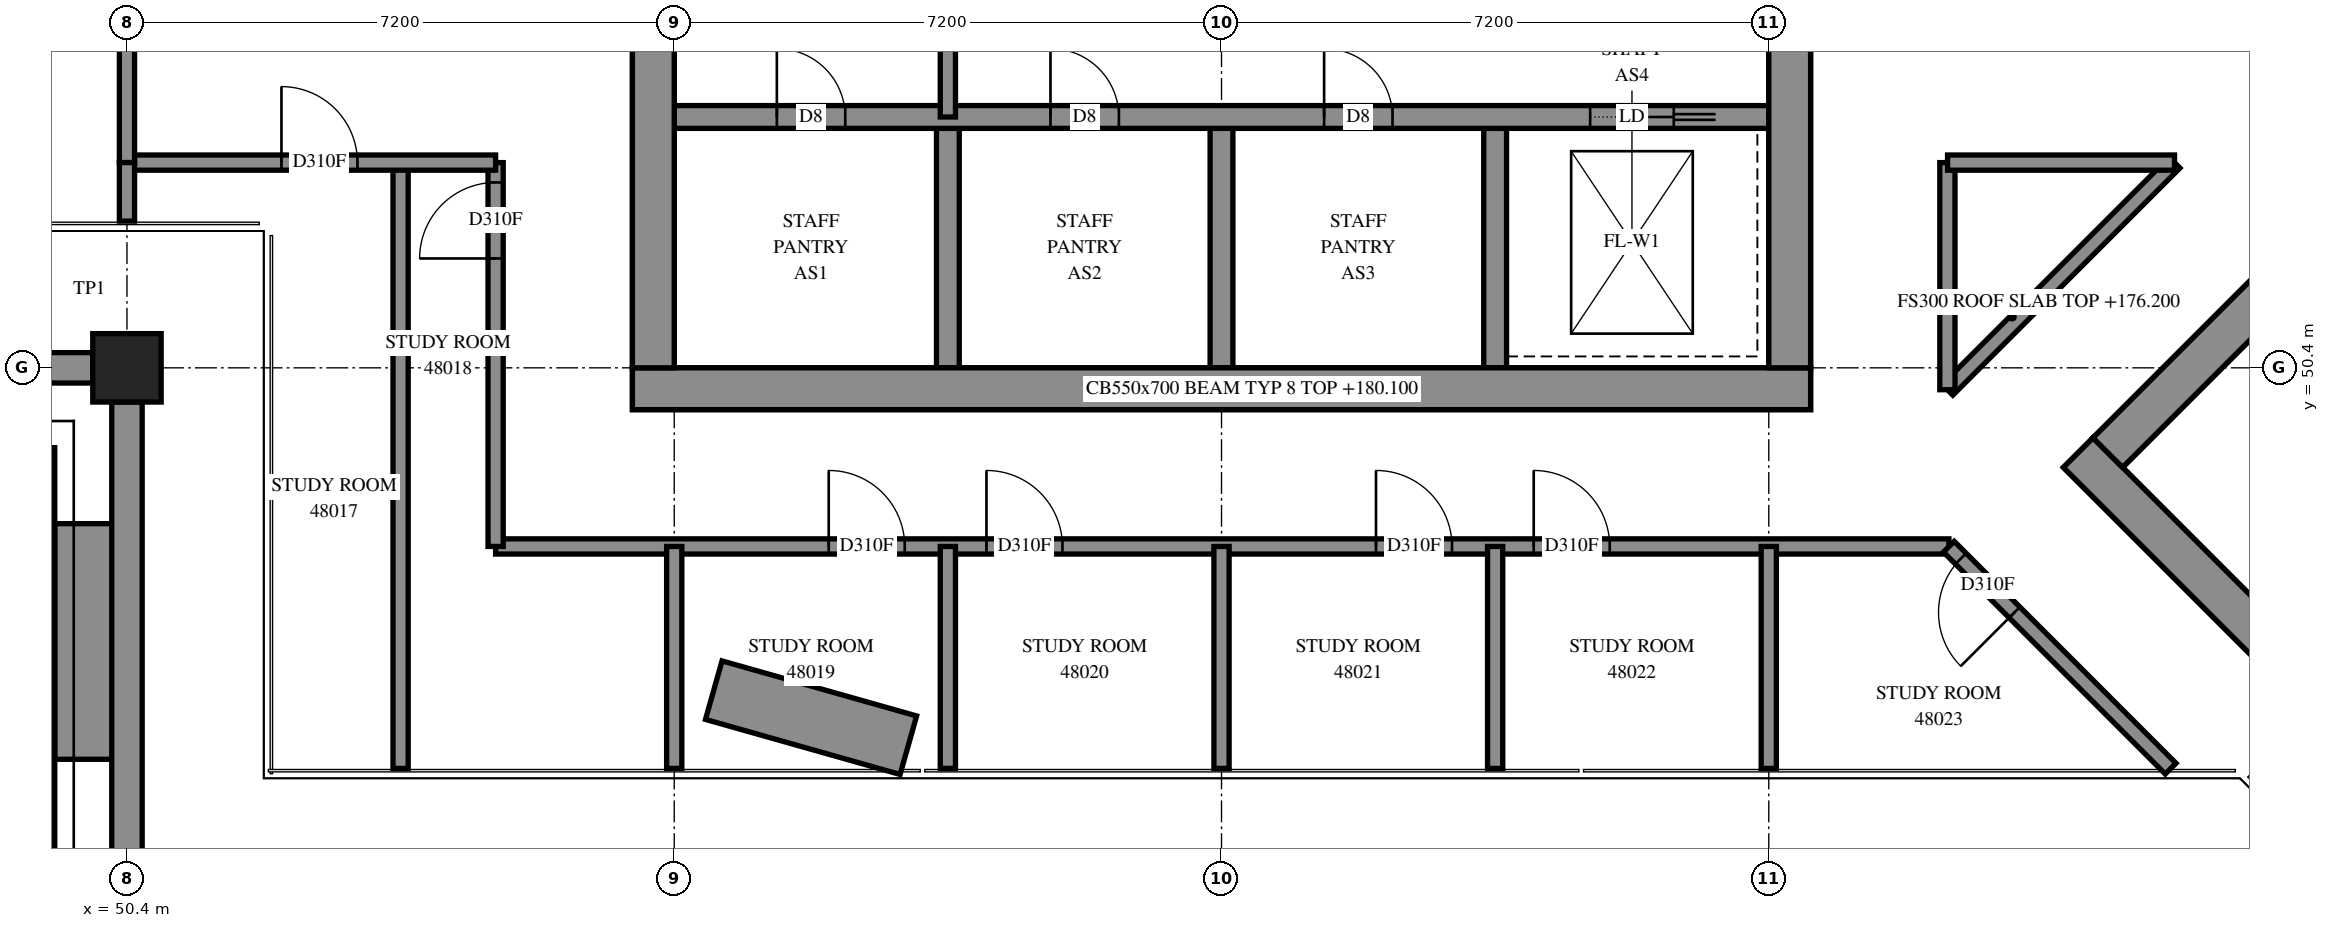
"""IFC4 building model, lengths in metres.
Left out: names, types, materials, properties, quantities, classifications, styles, units other than length and angle.
Written with IfcOpenShell. Run it as: python <this file> out.ifc"""

import sys

from ifc_helpers import new_model, si_unit, direction, frame, frame_2d, origin, origin_2d, place, context, subcontext, project, spatial, polyline, rectangle, outline, extrude, element, fill, save


model = new_model("IFC4")
c1 = context("Model", 3, precision=1e-05, world=origin(), true_north=direction((0.0, 1.0)))
c2 = subcontext(c1, "Body", "Model", "MODEL_VIEW")
j1 = project(units=[si_unit("LENGTHUNIT", "METRE"), si_unit("PLANEANGLEUNIT", "RADIAN")], contexts=[c1])
p1 = place(None, origin())
s1 = spatial("IfcSite", under=j1, at=p1, CompositionType="ELEMENT")
p2 = place(p1, origin())
s2 = spatial("IfcBuilding", under=s1, at=p2, CompositionType="ELEMENT")
p3 = place(p2, frame((0.0, 0.0, 176.2)))
s3 = spatial("IfcBuildingStorey", under=s2, at=p3, CompositionType="ELEMENT", Elevation=176.2)
p4 = place(p3, frame((50.4, 50.4, 0.0), z_axis=(0.0, 0.0, 1.0), x_axis=(1.0, 0.0, 0.0)))
e1 = element("IfcColumn", 1, at=p4, inside=s3, PredefinedType="COLUMN", context=c2, shape_type="SweptSolid", body=[
    extrude(rectangle(XDim=0.9, YDim=0.9, at=origin_2d()), origin(), (0.0, 0.0, 1.0), 3.9),
])
p5 = place(p3, frame((57.05, 50.125, -0.3), z_axis=(0.0, 0.0, 1.0), x_axis=(1.0, 0.0, 0.0)))
e2 = element("IfcWall", 2, at=p5, inside=s3, PredefinedType="SHEAR", context=c2, shape_type="SweptSolid", body=[
    extrude(rectangle(XDim=15.5, YDim=0.55, at=frame_2d((7.75, 0.0))), origin(), (0.0, 0.0, 1.0), 3.5),
])
p6 = place(p3, frame((57.325, 50.4, -0.3), z_axis=(0.0, 0.0, 1.0), x_axis=(0.0, 1.0, 0.0)))
e3 = element("IfcWall", 3, at=p6, inside=s3, PredefinedType="SHEAR", context=c2, shape_type="SweptSolid", body=[
    extrude(rectangle(XDim=14.4, YDim=0.55, at=frame_2d((7.2, 0.0))), origin(), (0.0, 0.0, 1.0), 3.5),
])
p7 = place(p6, frame((4.55, 0.0, 0.3)))
e4 = element("IfcOpeningElement", 4, at=p7, cuts=e3, PredefinedType="OPENING", context=c2, shape_type="SweptSolid", body=[
    extrude(rectangle(XDim=1.1, YDim=2.1, at=frame_2d((0.55, 1.05))), frame((0.0, 0.285, 0.0), z_axis=(0.0, -1.0, 0.0), x_axis=(1.0, 0.0, 0.0)), (0.0, 0.0, 1.0), 0.57),
])
p8 = place(p6, frame((11.35, 0.0, 0.3)))
e5 = element("IfcOpeningElement", 5, at=p8, cuts=e3, PredefinedType="OPENING", context=c2, shape_type="SweptSolid", body=[
    extrude(rectangle(XDim=1.1, YDim=2.1, at=frame_2d((0.55, 1.05))), frame((0.0, 0.285, 0.0), z_axis=(0.0, -1.0, 0.0), x_axis=(1.0, 0.0, 0.0)), (0.0, 0.0, 1.0), 0.57),
])
p9 = place(p3, frame((72.275, 50.4, -0.3), z_axis=(0.0, 0.0, 1.0), x_axis=(0.0, 1.0, 0.0)))
e6 = element("IfcWall", 6, at=p9, inside=s3, PredefinedType="SHEAR", context=c2, shape_type="SweptSolid", body=[
    extrude(rectangle(XDim=14.4, YDim=0.55, at=frame_2d((7.2, 0.0))), origin(), (0.0, 0.0, 1.0), 3.5),
])
p10 = place(p9, frame((4.55, 0.0, 0.3)))
e7 = element("IfcOpeningElement", 7, at=p10, cuts=e6, PredefinedType="OPENING", context=c2, shape_type="SweptSolid", body=[
    extrude(rectangle(XDim=1.1, YDim=2.1, at=frame_2d((0.55, 1.05))), frame((0.0, 0.285, 0.0), z_axis=(0.0, -1.0, 0.0), x_axis=(1.0, 0.0, 0.0)), (0.0, 0.0, 1.0), 0.57),
])
p11 = place(p9, frame((11.35, 0.0, 0.3)))
e8 = element("IfcOpeningElement", 8, at=p11, cuts=e6, PredefinedType="OPENING", context=c2, shape_type="SweptSolid", body=[
    extrude(rectangle(XDim=1.1, YDim=2.1, at=frame_2d((0.55, 1.05))), frame((0.0, 0.285, 0.0), z_axis=(0.0, -1.0, 0.0), x_axis=(1.0, 0.0, 0.0)), (0.0, 0.0, 1.0), 0.57),
])
for number, where, z_axis, x_axis in (
    (9, (61.2, 50.4, 0.0), (0.0, 0.0, 1.0), (0.0, 1.0, 0.0)),
    (10, (64.8, 50.4, 0.0), (0.0, 0.0, 1.0), (0.0, 1.0, 0.0)),
    (11, (68.4, 50.4, 0.0), (0.0, 0.0, 1.0), (0.0, 1.0, 0.0)),
):
    element("IfcWall", number, at=place(p3, frame(where, z_axis=z_axis, x_axis=x_axis)), inside=s3, PredefinedType="SOLIDWALL", context=c2, shape_type="SweptSolid", body=[
        extrude(rectangle(XDim=3.3, YDim=0.3, at=frame_2d((1.65, 0.0))), origin(), (0.0, 0.0, 1.0), 3.9),
    ])
p12 = place(p3, frame((57.6, 53.7, 0.0), z_axis=(0.0, 0.0, 1.0), x_axis=(1.0, 0.0, 0.0)))
e12 = element("IfcWall", 12, at=p12, inside=s3, PredefinedType="SOLIDWALL", context=c2, shape_type="SweptSolid", body=[
    extrude(rectangle(XDim=14.4, YDim=0.3, at=frame_2d((7.2, 0.0))), origin(), (0.0, 0.0, 1.0), 3.9),
])
p13 = place(p12, frame((1.35, 0.0, 0.0)))
e13 = element("IfcOpeningElement", 13, at=p13, cuts=e12, PredefinedType="OPENING", context=c2, shape_type="SweptSolid", body=[
    extrude(rectangle(XDim=0.9, YDim=2.1, at=frame_2d((0.45, 1.05))), frame((0.0, 0.16, 0.0), z_axis=(0.0, -1.0, 0.0), x_axis=(1.0, 0.0, 0.0)), (0.0, 0.0, 1.0), 0.32),
])
p14 = place(p12, frame((4.95, 0.0, 0.0)))
e14 = element("IfcOpeningElement", 14, at=p14, cuts=e12, PredefinedType="OPENING", context=c2, shape_type="SweptSolid", body=[
    extrude(rectangle(XDim=0.9, YDim=2.1, at=frame_2d((0.45, 1.05))), frame((0.0, 0.16, 0.0), z_axis=(0.0, -1.0, 0.0), x_axis=(1.0, 0.0, 0.0)), (0.0, 0.0, 1.0), 0.32),
])
p15 = place(p12, frame((8.55, 0.0, 0.0)))
e15 = element("IfcOpeningElement", 15, at=p15, cuts=e12, PredefinedType="OPENING", context=c2, shape_type="SweptSolid", body=[
    extrude(rectangle(XDim=0.9, YDim=2.1, at=frame_2d((0.45, 1.05))), frame((0.0, 0.16, 0.0), z_axis=(0.0, -1.0, 0.0), x_axis=(1.0, 0.0, 0.0)), (0.0, 0.0, 1.0), 0.32),
])
p16 = place(p12, frame((12.05, 0.0, 0.0)))
e16 = element("IfcOpeningElement", 16, at=p16, cuts=e12, PredefinedType="OPENING", context=c2, shape_type="SweptSolid", body=[
    extrude(rectangle(XDim=1.1, YDim=2.1, at=frame_2d((0.55, 1.05))), frame((0.0, 0.16, 0.0), z_axis=(0.0, -1.0, 0.0), x_axis=(1.0, 0.0, 0.0)), (0.0, 0.0, 1.0), 0.32),
])
p17 = place(p3, frame((76.071, 49.284, -0.3), z_axis=(0.0, 0.0, 1.0), x_axis=(0.7071035554, -0.707110007, 0.0)))
e17 = element("IfcWall", 17, at=p17, inside=s3, PredefinedType="SHEAR", context=c2, shape_type="SweptSolid", body=[
    extrude(rectangle(XDim=15.5, YDim=0.55, at=frame_2d((7.75, 0.0))), origin(), (0.0, 0.0, 1.0), 3.5),
])
p18 = place(p3, frame((76.46, 49.284, -0.3), z_axis=(0.0, 0.0, 1.0), x_axis=(0.7071067812, 0.7071067812, 0.0)))
e18 = element("IfcWall", 18, at=p18, inside=s3, PredefinedType="SHEAR", context=c2, shape_type="SweptSolid", body=[
    extrude(rectangle(XDim=14.4, YDim=0.55, at=frame_2d((7.2, 0.0))), origin(), (0.0, 0.0, 1.0), 3.5),
])
p19 = place(p18, frame((4.55, 0.0, 0.3)))
e19 = element("IfcOpeningElement", 19, at=p19, cuts=e18, PredefinedType="OPENING", context=c2, shape_type="SweptSolid", body=[
    extrude(rectangle(XDim=1.1, YDim=2.1, at=frame_2d((0.55, 1.05))), frame((0.0, 0.285, 0.0), z_axis=(0.0, -1.0, 0.0), x_axis=(1.0, 0.0, 0.0)), (0.0, 0.0, 1.0), 0.57),
])
p20 = place(p18, frame((11.35, 0.0, 0.3)))
e20 = element("IfcOpeningElement", 20, at=p20, cuts=e18, PredefinedType="OPENING", context=c2, shape_type="SweptSolid", body=[
    extrude(rectangle(XDim=1.1, YDim=2.1, at=frame_2d((0.55, 1.05))), frame((0.0, 0.285, 0.0), z_axis=(0.0, -1.0, 0.0), x_axis=(1.0, 0.0, 0.0)), (0.0, 0.0, 1.0), 0.57),
])
p21 = place(p3, frame((49.85, 48.35, 0.0), z_axis=(0.0, 0.0, 1.0), x_axis=(0.0, -1.0, 0.0)))
e21 = element("IfcWall", 21, at=p21, inside=s3, PredefinedType="SOLIDWALL", context=c2, shape_type="SweptSolid", body=[
    extrude(rectangle(XDim=3.1, YDim=0.8, at=frame_2d((1.55, 0.0))), origin(), (0.0, 0.0, 1.0), 0.65),
])
p22 = place(p3, frame((60.68, 45.435, 0.0), z_axis=(0.0, 0.0, 1.0), x_axis=(-0.9622679046, 0.2721038032, 0.0)))
e22 = element("IfcWall", 22, at=p22, inside=s3, PredefinedType="SOLIDWALL", context=c2, shape_type="SweptSolid", body=[
    extrude(rectangle(XDim=2.66, YDim=0.8, at=frame_2d((1.33, 0.0))), origin(), (0.0, 0.0, 1.0), 0.65),
])
p23 = place(p3, frame((42.15, 49.35, 0.0), z_axis=(0.0, 0.0, 1.0), x_axis=(1.0, 0.0, 0.0)))
e23 = element("IfcWall", 23, at=p23, inside=s3, PredefinedType="SOLIDWALL", context=c2, shape_type="SweptSolid", body=[
    extrude(outline(polyline([(-0.1, -0.1), (7.1, -0.1), (7.3, 0.1), (0.1, 0.1), (-0.1, -0.1)])), origin(), (0.0, 0.0, 1.0), 4.2),
])
p24 = place(p3, frame((49.35, 49.35, 0.0), z_axis=(0.0, 0.0, 1.0), x_axis=(0.0, -1.0, 0.0)))
e24 = element("IfcWall", 24, at=p24, inside=s3, PredefinedType="SOLIDWALL", context=c2, shape_type="SweptSolid", body=[
    extrude(outline(polyline([(0.1, -0.1), (7.3, -0.1), (7.1, 0.1), (-0.1, 0.1), (0.1, -0.1)])), origin(), (0.0, 0.0, 1.0), 4.2),
])
p25 = place(p3, frame((61.2, 53.7, 0.0), z_axis=(0.0, 0.0, 1.0), x_axis=(0.0, 1.0, 0.0)))
e25 = element("IfcWall", 25, at=p25, inside=s3, PredefinedType="PARTITIONING", context=c2, shape_type="SweptSolid", body=[
    extrude(rectangle(XDim=3.6, YDim=0.2, at=frame_2d((1.8, 0.0))), origin(), (0.0, 0.0, 1.0), 3.9),
])
p26 = place(p3, frame((55.25, 48.05, 0.0), z_axis=(0.0, 0.0, 1.0), x_axis=(1.0, 0.0, 0.0)))
e26 = element("IfcWall", 26, at=p26, inside=s3, PredefinedType="PARTITIONING", context=c2, shape_type="SweptSolid", body=[
    extrude(rectangle(XDim=19.12, YDim=0.2, at=frame_2d((9.56, 0.0))), origin(), (0.0, 0.0, 1.0), 3.9),
])
p27 = place(p26, frame((4.383, 0.0, 0.0)))
e27 = element("IfcOpeningElement", 27, at=p27, cuts=e26, PredefinedType="OPENING", context=c2, shape_type="SweptSolid", body=[
    extrude(rectangle(XDim=1.0, YDim=2.1, at=frame_2d((0.5, 1.05))), frame((0.0, 0.11, 0.0), z_axis=(0.0, -1.0, 0.0), x_axis=(1.0, 0.0, 0.0)), (0.0, 0.0, 1.0), 0.22),
])
p28 = place(p26, frame((6.457, 0.0, 0.0)))
e28 = element("IfcOpeningElement", 28, at=p28, cuts=e26, PredefinedType="OPENING", context=c2, shape_type="SweptSolid", body=[
    extrude(rectangle(XDim=1.0, YDim=2.1, at=frame_2d((0.5, 1.05))), frame((0.0, 0.11, 0.0), z_axis=(0.0, -1.0, 0.0), x_axis=(1.0, 0.0, 0.0)), (0.0, 0.0, 1.0), 0.22),
])
p29 = place(p26, frame((11.582, 0.0, 0.0)))
e29 = element("IfcOpeningElement", 29, at=p29, cuts=e26, PredefinedType="OPENING", context=c2, shape_type="SweptSolid", body=[
    extrude(rectangle(XDim=1.0, YDim=2.1, at=frame_2d((0.5, 1.05))), frame((0.0, 0.11, 0.0), z_axis=(0.0, -1.0, 0.0), x_axis=(1.0, 0.0, 0.0)), (0.0, 0.0, 1.0), 0.22),
])
p30 = place(p26, frame((13.658, 0.0, 0.0)))
e30 = element("IfcOpeningElement", 30, at=p30, cuts=e26, PredefinedType="OPENING", context=c2, shape_type="SweptSolid", body=[
    extrude(rectangle(XDim=1.0, YDim=2.1, at=frame_2d((0.5, 1.05))), frame((0.0, 0.11, 0.0), z_axis=(0.0, -1.0, 0.0), x_axis=(1.0, 0.0, 0.0)), (0.0, 0.0, 1.0), 0.22),
])
p31 = place(p3, frame((54.0, 45.13, 0.0), z_axis=(0.0, 0.0, 1.0), x_axis=(0.0, 1.0, 0.0)))
e31 = element("IfcWall", 31, at=p31, inside=s3, PredefinedType="PARTITIONING", context=c2, shape_type="SweptSolid", body=[
    extrude(rectangle(XDim=7.97, YDim=0.2, at=frame_2d((3.985, 0.0))), origin(), (0.0, 0.0, 1.0), 3.9),
])
p32 = place(p3, frame((55.25, 48.05, 0.0), z_axis=(0.0, 0.0, 1.0), x_axis=(0.0, 1.0, 0.0)))
e32 = element("IfcWall", 32, at=p32, inside=s3, PredefinedType="PARTITIONING", context=c2, shape_type="SweptSolid", body=[
    extrude(rectangle(XDim=5.05, YDim=0.2, at=frame_2d((2.525, 0.0))), origin(), (0.0, 0.0, 1.0), 3.9),
])
p33 = place(p32, frame((3.789, 0.0, 0.0)))
e33 = element("IfcOpeningElement", 33, at=p33, cuts=e32, PredefinedType="OPENING", context=c2, shape_type="SweptSolid", body=[
    extrude(rectangle(XDim=1.0, YDim=2.1, at=frame_2d((0.5, 1.05))), frame((0.0, 0.11, 0.0), z_axis=(0.0, -1.0, 0.0), x_axis=(1.0, 0.0, 0.0)), (0.0, 0.0, 1.0), 0.22),
])
p34 = place(p3, frame((50.4, 53.1, 0.0), z_axis=(0.0, 0.0, 1.0), x_axis=(1.0, 0.0, 0.0)))
e34 = element("IfcWall", 34, at=p34, inside=s3, PredefinedType="PARTITIONING", context=c2, shape_type="SweptSolid", body=[
    extrude(rectangle(XDim=4.85, YDim=0.2, at=frame_2d((2.425, 0.0))), origin(), (0.0, 0.0, 1.0), 3.9),
])
p35 = place(p34, frame((2.033, 0.0, 0.0)))
e35 = element("IfcOpeningElement", 35, at=p35, cuts=e34, PredefinedType="OPENING", context=c2, shape_type="SweptSolid", body=[
    extrude(rectangle(XDim=1.0, YDim=2.1, at=frame_2d((0.5, 1.05))), frame((0.0, 0.11, 0.0), z_axis=(0.0, -1.0, 0.0), x_axis=(1.0, 0.0, 0.0)), (0.0, 0.0, 1.0), 0.22),
])
p36 = place(p3, frame((74.351, 50.111, 0.0), z_axis=(0.0, 0.0, 1.0), x_axis=(0.7071067812, 0.7071067812, 0.0)))
e36 = element("IfcWall", 36, at=p36, inside=s3, PredefinedType="PARTITIONING", context=c2, shape_type="SweptSolid", body=[
    extrude(rectangle(XDim=4.226, YDim=0.2, at=frame_2d((2.113, 0.0))), origin(), (0.0, 0.0, 1.0), 3.9),
])
p37 = place(p3, frame((77.287, 45.127, 0.0), z_axis=(0.0, 0.0, 1.0), x_axis=(-0.7069614206, 0.7072521119, 0.0)))
e37 = element("IfcWall", 37, at=p37, inside=s3, PredefinedType="PARTITIONING", context=c2, shape_type="SweptSolid", body=[
    extrude(rectangle(XDim=4.128, YDim=0.2, at=frame_2d((2.064, 0.0))), origin(), (0.0, 0.0, 1.0), 3.9),
])
p38 = place(p37, frame((2.906, 0.0, 0.0)))
e38 = element("IfcOpeningElement", 38, at=p38, cuts=e37, PredefinedType="OPENING", context=c2, shape_type="SweptSolid", body=[
    extrude(rectangle(XDim=1.0, YDim=2.1, at=frame_2d((0.5, 1.05))), frame((0.0, 0.11, 0.0), z_axis=(0.0, -1.0, 0.0), x_axis=(1.0, 0.0, 0.0)), (0.0, 0.0, 1.0), 0.22),
])
p39 = place(p3, frame((74.35, 50.112, 0.0), z_axis=(0.0, 0.0, 1.0), x_axis=(0.0, 1.0, 0.0)))
e39 = element("IfcWall", 39, at=p39, inside=s3, PredefinedType="PARTITIONING", context=c2, shape_type="SweptSolid", body=[
    extrude(rectangle(XDim=2.988, YDim=0.2, at=frame_2d((1.494, 0.0))), origin(), (0.0, 0.0, 1.0), 3.9),
])
p40 = place(p3, frame((74.352, 53.1, 0.0), z_axis=(0.0, 0.0, 1.0), x_axis=(1.0, 0.0, 0.0)))
e40 = element("IfcWall", 40, at=p40, inside=s3, PredefinedType="PARTITIONING", context=c2, shape_type="SweptSolid", body=[
    extrude(rectangle(XDim=2.986, YDim=0.2, at=frame_2d((1.493, 0.0))), origin(), (0.0, 0.0, 1.0), 3.9),
])
for number, where, z_axis, x_axis in (
    (41, (57.6, 45.13, 0.0), (0.0, 0.0, 1.0), (0.0, 1.0, 0.0)),
    (42, (61.2, 45.13, 0.0), (0.0, 0.0, 1.0), (0.0, 1.0, 0.0)),
    (43, (64.8, 45.13, 0.0), (0.0, 0.0, 1.0), (0.0, 1.0, 0.0)),
    (44, (68.4, 45.13, 0.0), (0.0, 0.0, 1.0), (0.0, 1.0, 0.0)),
    (45, (72.0, 45.13, 0.0), (0.0, 0.0, 1.0), (0.0, 1.0, 0.0)),
):
    element("IfcWall", number, at=place(p3, frame(where, z_axis=z_axis, x_axis=x_axis)), inside=s3, PredefinedType="PARTITIONING", context=c2, shape_type="SweptSolid", body=[
        extrude(rectangle(XDim=2.92, YDim=0.2, at=frame_2d((1.46, 0.0))), origin(), (0.0, 0.0, 1.0), 3.9),
    ])
p41 = place(p3, frame((50.4, 53.1, 0.0), z_axis=(0.0, 0.0, 1.0), x_axis=(0.0, 1.0, 0.0)))
e46 = element("IfcWall", 46, at=p41, inside=s3, PredefinedType="PARTITIONING", context=c2, shape_type="SweptSolid", body=[
    extrude(rectangle(XDim=1.8, YDim=0.2, at=frame_2d((0.9, 0.0))), origin(), (0.0, 0.0, 1.0), 3.9),
])
p42 = place(p3, frame((50.4, 52.33, 0.0), z_axis=(0.0, 0.0, 1.0), x_axis=(0.0, 1.0, 0.0)))
e47 = element("IfcWall", 47, at=p42, inside=s3, PredefinedType="PARTITIONING", context=c2, shape_type="SweptSolid", body=[
    extrude(rectangle(XDim=0.77, YDim=0.2, at=frame_2d((0.385, 0.0))), origin(), (0.0, 0.0, 1.0), 3.9),
])
p43 = place(p13, origin())
e48 = element("IfcDoor", 48, at=p43, inside=s3, OperationType="SINGLE_SWING_LEFT", PredefinedType="DOOR", context=c2, shape_type="SweptSolid", body=[
    extrude(rectangle(XDim=0.9, YDim=2.1, at=frame_2d((0.45, 1.05))), frame((0.0, 0.025, 0.0), z_axis=(0.0, -1.0, 0.0), x_axis=(1.0, 0.0, 0.0)), (0.0, 0.0, 1.0), 0.05),
])
fill(e13, e48)
p44 = place(p14, origin())
e49 = element("IfcDoor", 49, at=p44, inside=s3, OperationType="SINGLE_SWING_LEFT", PredefinedType="DOOR", context=c2, shape_type="SweptSolid", body=[
    extrude(rectangle(XDim=0.9, YDim=2.1, at=frame_2d((0.45, 1.05))), frame((0.0, 0.025, 0.0), z_axis=(0.0, -1.0, 0.0), x_axis=(1.0, 0.0, 0.0)), (0.0, 0.0, 1.0), 0.05),
])
fill(e14, e49)
p45 = place(p15, origin())
e50 = element("IfcDoor", 50, at=p45, inside=s3, OperationType="SINGLE_SWING_LEFT", PredefinedType="DOOR", context=c2, shape_type="SweptSolid", body=[
    extrude(rectangle(XDim=0.9, YDim=2.1, at=frame_2d((0.45, 1.05))), frame((0.0, 0.025, 0.0), z_axis=(0.0, -1.0, 0.0), x_axis=(1.0, 0.0, 0.0)), (0.0, 0.0, 1.0), 0.05),
])
fill(e15, e50)
p46 = place(p16, origin())
e51 = element("IfcDoor", 51, at=p46, inside=s3, OperationType="SLIDING_TO_RIGHT", PredefinedType="DOOR", context=c2, shape_type="SweptSolid", body=[
    extrude(rectangle(XDim=1.1, YDim=2.1, at=frame_2d((0.55, 1.05))), frame((0.0, 0.025, 0.0), z_axis=(0.0, -1.0, 0.0), x_axis=(1.0, 0.0, 0.0)), (0.0, 0.0, 1.0), 0.05),
])
fill(e16, e51)
p47 = place(p35, origin())
e52 = element("IfcDoor", 52, at=p47, inside=s3, OperationType="SINGLE_SWING_LEFT", PredefinedType="DOOR", context=c2, shape_type="SweptSolid", body=[
    extrude(rectangle(XDim=1.0, YDim=2.1, at=frame_2d((0.5, 1.05))), frame((0.0, 0.025, 0.0), z_axis=(0.0, -1.0, 0.0), x_axis=(1.0, 0.0, 0.0)), (0.0, 0.0, 1.0), 0.05),
])
fill(e35, e52)
p48 = place(p33, origin())
e53 = element("IfcDoor", 53, at=p48, inside=s3, OperationType="SINGLE_SWING_RIGHT", PredefinedType="DOOR", context=c2, shape_type="SweptSolid", body=[
    extrude(rectangle(XDim=1.0, YDim=2.1, at=frame_2d((0.5, 1.05))), frame((0.0, 0.025, 0.0), z_axis=(0.0, -1.0, 0.0), x_axis=(1.0, 0.0, 0.0)), (0.0, 0.0, 1.0), 0.05),
])
fill(e33, e53)
p49 = place(p27, origin())
e54 = element("IfcDoor", 54, at=p49, inside=s3, OperationType="SINGLE_SWING_LEFT", PredefinedType="DOOR", context=c2, shape_type="SweptSolid", body=[
    extrude(rectangle(XDim=1.0, YDim=2.1, at=frame_2d((0.5, 1.05))), frame((0.0, 0.025, 0.0), z_axis=(0.0, -1.0, 0.0), x_axis=(1.0, 0.0, 0.0)), (0.0, 0.0, 1.0), 0.05),
])
fill(e27, e54)
p50 = place(p28, origin())
e55 = element("IfcDoor", 55, at=p50, inside=s3, OperationType="SINGLE_SWING_RIGHT", PredefinedType="DOOR", context=c2, shape_type="SweptSolid", body=[
    extrude(rectangle(XDim=1.0, YDim=2.1, at=frame_2d((0.5, 1.05))), frame((0.0, 0.025, 0.0), z_axis=(0.0, -1.0, 0.0), x_axis=(1.0, 0.0, 0.0)), (0.0, 0.0, 1.0), 0.05),
])
fill(e28, e55)
p51 = place(p29, origin())
e56 = element("IfcDoor", 56, at=p51, inside=s3, OperationType="SINGLE_SWING_LEFT", PredefinedType="DOOR", context=c2, shape_type="SweptSolid", body=[
    extrude(rectangle(XDim=1.0, YDim=2.1, at=frame_2d((0.5, 1.05))), frame((0.0, 0.025, 0.0), z_axis=(0.0, -1.0, 0.0), x_axis=(1.0, 0.0, 0.0)), (0.0, 0.0, 1.0), 0.05),
])
fill(e29, e56)
p52 = place(p30, origin())
e57 = element("IfcDoor", 57, at=p52, inside=s3, OperationType="SINGLE_SWING_RIGHT", PredefinedType="DOOR", context=c2, shape_type="SweptSolid", body=[
    extrude(rectangle(XDim=1.0, YDim=2.1, at=frame_2d((0.5, 1.05))), frame((0.0, 0.025, 0.0), z_axis=(0.0, -1.0, 0.0), x_axis=(1.0, 0.0, 0.0)), (0.0, 0.0, 1.0), 0.05),
])
fill(e30, e57)
p53 = place(p38, origin())
e58 = element("IfcDoor", 58, at=p53, inside=s3, OperationType="SINGLE_SWING_LEFT", PredefinedType="DOOR", context=c2, shape_type="SweptSolid", body=[
    extrude(rectangle(XDim=1.0, YDim=2.1, at=frame_2d((0.5, 1.05))), frame((0.0, 0.025, 0.0), z_axis=(0.0, -1.0, 0.0), x_axis=(1.0, 0.0, 0.0)), (0.0, 0.0, 1.0), 0.05),
])
fill(e38, e58)
save(model, sys.argv[1])
